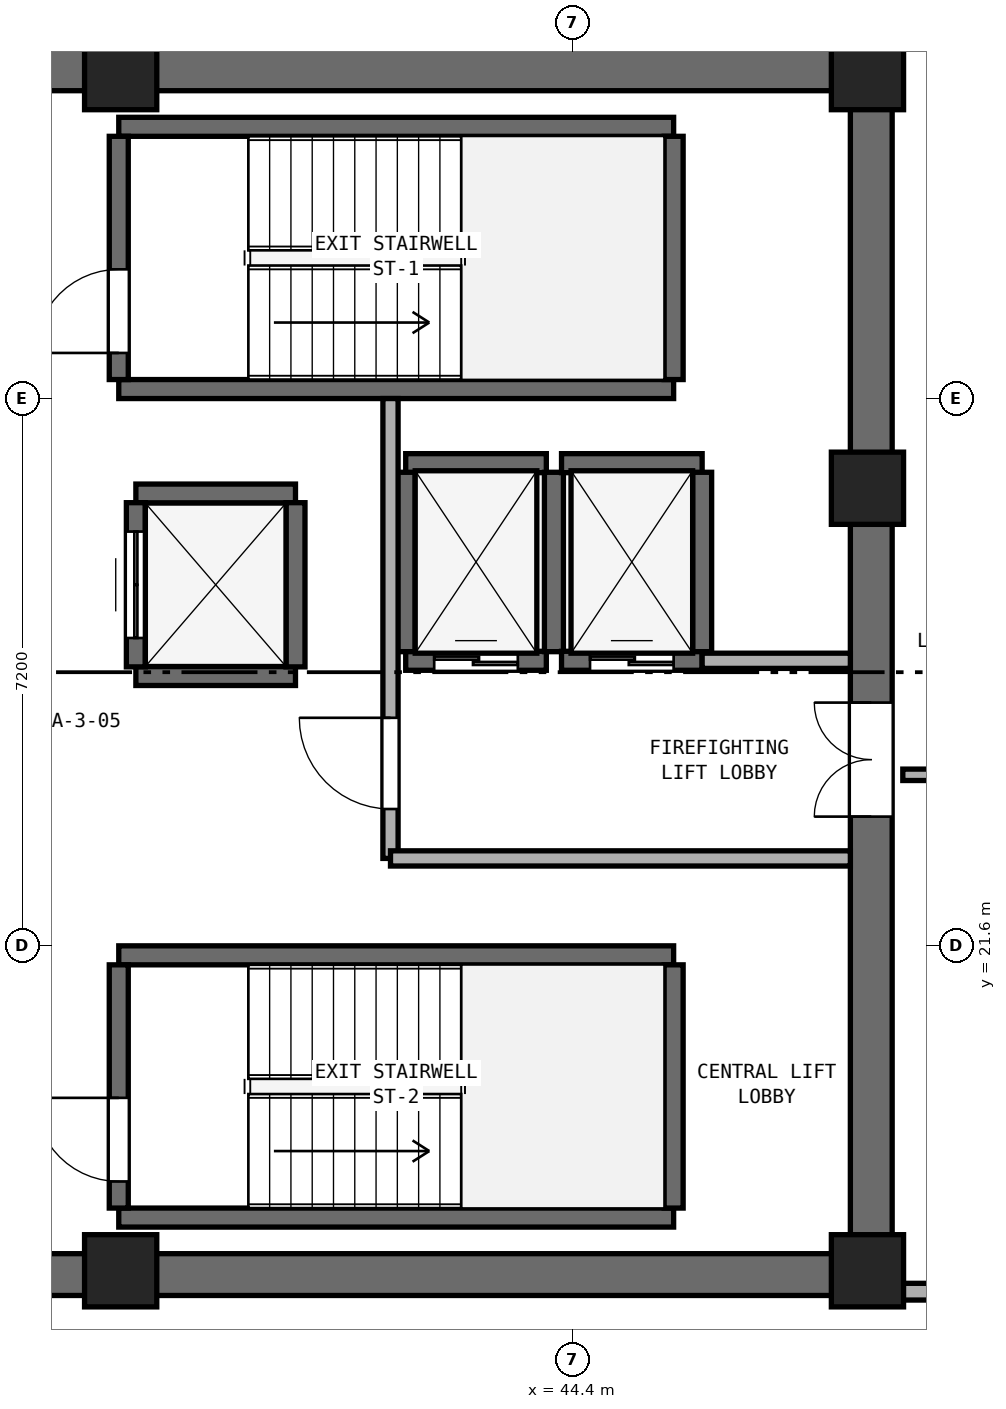
"""IFC4 building model, lengths in metres.
Left out: names, types, materials, properties, quantities, classifications, styles, units other than length and angle.
Written with IfcOpenShell. Run it as: python <this file> out.ifc"""

import sys

from ifc_helpers import new_model, si_unit, direction, frame, frame_2d, origin, origin_2d, place, context, subcontext, project, spatial, rectangle, extrude, element, fill, save


model = new_model("IFC4")
c1 = context("Model", 3, precision=1e-05, world=origin(), true_north=direction((0.0, 1.0)))
c2 = subcontext(c1, "Body", "Model", "MODEL_VIEW")
j1 = project(units=[si_unit("LENGTHUNIT", "METRE"), si_unit("PLANEANGLEUNIT", "RADIAN")], contexts=[c1])
p1 = place(None, origin())
s1 = spatial("IfcSite", under=j1, at=p1, CompositionType="ELEMENT")
p2 = place(p1, origin())
s2 = spatial("IfcBuilding", under=s1, at=p2, CompositionType="ELEMENT")
p3 = place(p2, frame((0.0, 0.0, 201.0)))
s3 = spatial("IfcBuildingStorey", under=s2, at=p3, CompositionType="ELEMENT", Elevation=201.0)
for number, where, z_axis, x_axis in (
    (1, (25.4, 17.275, 0.0), (0.0, 0.0, 1.0), (1.0, 0.0, 0.0)),
    (2, (25.4, 33.125, 0.0), (0.0, 0.0, 1.0), (1.0, 0.0, 0.0)),
):
    element("IfcWall", number, at=place(p3, frame(where, z_axis=z_axis, x_axis=x_axis)), inside=s3, PredefinedType="SHEAR", context=c2, shape_type="SweptSolid", body=[
        extrude(rectangle(XDim=23.2, YDim=0.55, at=frame_2d((11.6, 0.0))), origin(), (0.0, 0.0, 1.0), 3.54),
    ])
p4 = place(p3, frame((48.325, 17.55, 0.0), z_axis=(0.0, 0.0, 1.0), x_axis=(0.0, 1.0, 0.0)))
e3 = element("IfcWall", 3, at=p4, inside=s3, PredefinedType="SHEAR", context=c2, shape_type="SweptSolid", body=[
    extrude(rectangle(XDim=15.3, YDim=0.55, at=frame_2d((7.65, 0.0))), origin(), (0.0, 0.0, 1.0), 3.54),
])
p5 = place(p4, frame((5.75, 0.0, 0.0)))
e4 = element("IfcOpeningElement", 4, at=p5, cuts=e3, PredefinedType="OPENING", context=c2, shape_type="SweptSolid", body=[
    extrude(rectangle(XDim=1.5, YDim=2.15, at=frame_2d((0.75, 1.075))), frame((0.0, 0.285, 0.0), z_axis=(0.0, -1.0, 0.0), x_axis=(1.0, 0.0, 0.0)), (0.0, 0.0, 1.0), 0.57),
])
for number, where, z_axis, x_axis in (
    (5, (38.45, 17.325, 0.0), (0.0, 0.0, 1.0), (1.0, 0.0, 0.0)),
    (6, (48.275, 17.325, 0.0), (0.0, 0.0, 1.0), (1.0, 0.0, 0.0)),
    (7, (48.275, 27.62, 0.0), (0.0, 0.0, 1.0), (1.0, 0.0, 0.0)),
    (8, (48.275, 33.075, 0.0), (0.0, 0.0, 1.0), (1.0, 0.0, 0.0)),
    (9, (38.45, 33.075, 0.0), (0.0, 0.0, 1.0), (1.0, 0.0, 0.0)),
):
    element("IfcColumn", number, at=place(p3, frame(where, z_axis=z_axis, x_axis=x_axis)), inside=s3, PredefinedType="PILASTER", context=c2, shape_type="SweptSolid", body=[
        extrude(rectangle(XDim=0.95, YDim=0.95, at=origin_2d()), origin(), (0.0, 0.0, 1.0), 3.8),
    ])
for number, where, z_axis, x_axis in (
    (10, (38.425, 28.925, 0.0), (0.0, 0.0, 1.0), (1.0, 0.0, 0.0)),
    (11, (38.425, 32.375, 0.0), (0.0, 0.0, 1.0), (1.0, 0.0, 0.0)),
):
    element("IfcWall", number, at=place(p3, frame(where, z_axis=z_axis, x_axis=x_axis)), inside=s3, PredefinedType="SHEAR", context=c2, shape_type="SweptSolid", body=[
        extrude(rectangle(XDim=7.3, YDim=0.25, at=frame_2d((3.65, 0.0))), origin(), (0.0, 0.0, 1.0), 3.54),
    ])
p6 = place(p3, frame((38.425, 29.05, 0.0), z_axis=(0.0, 0.0, 1.0), x_axis=(0.0, 1.0, 0.0)))
e12 = element("IfcWall", 12, at=p6, inside=s3, PredefinedType="SHEAR", context=c2, shape_type="SweptSolid", body=[
    extrude(rectangle(XDim=3.2, YDim=0.25, at=frame_2d((1.6, 0.0))), origin(), (0.0, 0.0, 1.0), 3.54),
])
p7 = place(p6, frame((0.35, 0.0, 0.0)))
e13 = element("IfcOpeningElement", 13, at=p7, cuts=e12, PredefinedType="OPENING", context=c2, shape_type="SweptSolid", body=[
    extrude(rectangle(XDim=1.1, YDim=2.15, at=frame_2d((0.55, 1.075))), frame((0.0, 0.135, 0.0), z_axis=(0.0, -1.0, 0.0), x_axis=(1.0, 0.0, 0.0)), (0.0, 0.0, 1.0), 0.27),
])
p8 = place(p3, frame((45.725, 29.05, 0.0), z_axis=(0.0, 0.0, 1.0), x_axis=(0.0, 1.0, 0.0)))
e14 = element("IfcWall", 14, at=p8, inside=s3, PredefinedType="SHEAR", context=c2, shape_type="SweptSolid", body=[
    extrude(rectangle(XDim=3.2, YDim=0.25, at=frame_2d((1.6, 0.0))), origin(), (0.0, 0.0, 1.0), 3.54),
])
for number, where, z_axis, x_axis in (
    (15, (38.425, 18.025, 0.0), (0.0, 0.0, 1.0), (1.0, 0.0, 0.0)),
    (16, (38.425, 21.475, 0.0), (0.0, 0.0, 1.0), (1.0, 0.0, 0.0)),
):
    element("IfcWall", number, at=place(p3, frame(where, z_axis=z_axis, x_axis=x_axis)), inside=s3, PredefinedType="SHEAR", context=c2, shape_type="SweptSolid", body=[
        extrude(rectangle(XDim=7.3, YDim=0.25, at=frame_2d((3.65, 0.0))), origin(), (0.0, 0.0, 1.0), 3.54),
    ])
p9 = place(p3, frame((38.425, 18.15, 0.0), z_axis=(0.0, 0.0, 1.0), x_axis=(0.0, 1.0, 0.0)))
e17 = element("IfcWall", 17, at=p9, inside=s3, PredefinedType="SHEAR", context=c2, shape_type="SweptSolid", body=[
    extrude(rectangle(XDim=3.2, YDim=0.25, at=frame_2d((1.6, 0.0))), origin(), (0.0, 0.0, 1.0), 3.54),
])
p10 = place(p9, frame((0.35, 0.0, 0.0)))
e18 = element("IfcOpeningElement", 18, at=p10, cuts=e17, PredefinedType="OPENING", context=c2, shape_type="SweptSolid", body=[
    extrude(rectangle(XDim=1.1, YDim=2.15, at=frame_2d((0.55, 1.075))), frame((0.0, 0.135, 0.0), z_axis=(0.0, -1.0, 0.0), x_axis=(1.0, 0.0, 0.0)), (0.0, 0.0, 1.0), 0.27),
])
p11 = place(p3, frame((45.725, 18.15, 0.0), z_axis=(0.0, 0.0, 1.0), x_axis=(0.0, 1.0, 0.0)))
e19 = element("IfcWall", 19, at=p11, inside=s3, PredefinedType="SHEAR", context=c2, shape_type="SweptSolid", body=[
    extrude(rectangle(XDim=3.2, YDim=0.25, at=frame_2d((1.6, 0.0))), origin(), (0.0, 0.0, 1.0), 3.54),
])
p12 = place(p3, frame((42.2, 25.35, 0.0), z_axis=(0.0, 0.0, 1.0), x_axis=(1.0, 0.0, 0.0)))
e20 = element("IfcWall", 20, at=p12, inside=s3, PredefinedType="SHEAR", context=c2, shape_type="SweptSolid", body=[
    extrude(rectangle(XDim=1.85, YDim=0.25, at=frame_2d((0.925, 0.0))), origin(), (0.0, 0.0, 1.0), 3.54),
])
p13 = place(p12, frame((0.375, 0.0, 0.0)))
e21 = element("IfcOpeningElement", 21, at=p13, cuts=e20, PredefinedType="OPENING", context=c2, shape_type="SweptSolid", body=[
    extrude(rectangle(XDim=1.1, YDim=2.15, at=frame_2d((0.55, 1.075))), frame((0.0, 0.135, 0.0), z_axis=(0.0, -1.0, 0.0), x_axis=(1.0, 0.0, 0.0)), (0.0, 0.0, 1.0), 0.27),
])
p14 = place(p3, frame((42.2, 27.95, 0.0), z_axis=(0.0, 0.0, 1.0), x_axis=(1.0, 0.0, 0.0)))
e22 = element("IfcWall", 22, at=p14, inside=s3, PredefinedType="SHEAR", context=c2, shape_type="SweptSolid", body=[
    extrude(rectangle(XDim=1.85, YDim=0.25, at=frame_2d((0.925, 0.0))), origin(), (0.0, 0.0, 1.0), 3.54),
])
for number, where, z_axis, x_axis in (
    (23, (42.2, 25.47, 0.0), (0.0, 0.0, 1.0), (0.0, 1.0, 0.0)),
    (24, (44.15, 25.47, 0.0), (0.0, 0.0, 1.0), (0.0, 1.0, 0.0)),
):
    element("IfcWall", number, at=place(p3, frame(where, z_axis=z_axis, x_axis=x_axis)), inside=s3, PredefinedType="SHEAR", context=c2, shape_type="SweptSolid", body=[
        extrude(rectangle(XDim=2.36, YDim=0.25, at=frame_2d((1.18, 0.0))), origin(), (0.0, 0.0, 1.0), 3.54),
    ])
p15 = place(p3, frame((44.25, 25.35, 0.0), z_axis=(0.0, 0.0, 1.0), x_axis=(1.0, 0.0, 0.0)))
e25 = element("IfcWall", 25, at=p15, inside=s3, PredefinedType="SHEAR", context=c2, shape_type="SweptSolid", body=[
    extrude(rectangle(XDim=1.85, YDim=0.25, at=frame_2d((0.925, 0.0))), origin(), (0.0, 0.0, 1.0), 3.54),
])
p16 = place(p15, frame((0.375, 0.0, 0.0)))
e26 = element("IfcOpeningElement", 26, at=p16, cuts=e25, PredefinedType="OPENING", context=c2, shape_type="SweptSolid", body=[
    extrude(rectangle(XDim=1.1, YDim=2.15, at=frame_2d((0.55, 1.075))), frame((0.0, 0.135, 0.0), z_axis=(0.0, -1.0, 0.0), x_axis=(1.0, 0.0, 0.0)), (0.0, 0.0, 1.0), 0.27),
])
p17 = place(p3, frame((44.25, 27.95, 0.0), z_axis=(0.0, 0.0, 1.0), x_axis=(1.0, 0.0, 0.0)))
e27 = element("IfcWall", 27, at=p17, inside=s3, PredefinedType="SHEAR", context=c2, shape_type="SweptSolid", body=[
    extrude(rectangle(XDim=1.85, YDim=0.25, at=frame_2d((0.925, 0.0))), origin(), (0.0, 0.0, 1.0), 3.54),
])
p18 = place(p3, frame((46.1, 25.47, 0.0), z_axis=(0.0, 0.0, 1.0), x_axis=(0.0, 1.0, 0.0)))
e28 = element("IfcWall", 28, at=p18, inside=s3, PredefinedType="SHEAR", context=c2, shape_type="SweptSolid", body=[
    extrude(rectangle(XDim=2.36, YDim=0.25, at=frame_2d((1.18, 0.0))), origin(), (0.0, 0.0, 1.0), 3.54),
])
for number, where, z_axis, x_axis in (
    (29, (38.65, 25.15, 0.0), (0.0, 0.0, 1.0), (1.0, 0.0, 0.0)),
    (30, (38.65, 27.55, 0.0), (0.0, 0.0, 1.0), (1.0, 0.0, 0.0)),
):
    element("IfcWall", number, at=place(p3, frame(where, z_axis=z_axis, x_axis=x_axis)), inside=s3, PredefinedType="SHEAR", context=c2, shape_type="SweptSolid", body=[
        extrude(rectangle(XDim=2.1, YDim=0.25, at=frame_2d((1.05, 0.0))), origin(), (0.0, 0.0, 1.0), 3.54),
    ])
p19 = place(p3, frame((38.65, 25.27, 0.0), z_axis=(0.0, 0.0, 1.0), x_axis=(0.0, 1.0, 0.0)))
e31 = element("IfcWall", 31, at=p19, inside=s3, PredefinedType="SHEAR", context=c2, shape_type="SweptSolid", body=[
    extrude(rectangle(XDim=2.16, YDim=0.25, at=frame_2d((1.08, 0.0))), origin(), (0.0, 0.0, 1.0), 3.54),
])
p20 = place(p19, frame((0.38, 0.0, 0.0)))
e32 = element("IfcOpeningElement", 32, at=p20, cuts=e31, PredefinedType="OPENING", context=c2, shape_type="SweptSolid", body=[
    extrude(rectangle(XDim=1.4, YDim=2.2, at=frame_2d((0.7, 1.1))), frame((0.0, 0.135, 0.0), z_axis=(0.0, -1.0, 0.0), x_axis=(1.0, 0.0, 0.0)), (0.0, 0.0, 1.0), 0.27),
])
p21 = place(p3, frame((40.75, 25.27, 0.0), z_axis=(0.0, 0.0, 1.0), x_axis=(0.0, 1.0, 0.0)))
e33 = element("IfcWall", 33, at=p21, inside=s3, PredefinedType="SHEAR", context=c2, shape_type="SweptSolid", body=[
    extrude(rectangle(XDim=2.16, YDim=0.25, at=frame_2d((1.08, 0.0))), origin(), (0.0, 0.0, 1.0), 3.54),
])
p22 = place(p3, frame((42.0, 22.75, 0.0), z_axis=(0.0, 0.0, 1.0), x_axis=(0.0, 1.0, 0.0)))
e34 = element("IfcWall", 34, at=p22, inside=s3, PredefinedType="SOLIDWALL", context=c2, shape_type="SweptSolid", body=[
    extrude(rectangle(XDim=6.05, YDim=0.2, at=frame_2d((3.025, 0.0))), origin(), (0.0, 0.0, 1.0), 3.54),
])
p23 = place(p22, frame((0.65, 0.0, 0.0)))
e35 = element("IfcOpeningElement", 35, at=p23, cuts=e34, PredefinedType="OPENING", context=c2, shape_type="SweptSolid", body=[
    extrude(rectangle(XDim=1.2, YDim=2.15, at=frame_2d((0.6, 1.075))), frame((0.0, 0.11, 0.0), z_axis=(0.0, -1.0, 0.0), x_axis=(1.0, 0.0, 0.0)), (0.0, 0.0, 1.0), 0.22),
])
p24 = place(p3, frame((42.0, 22.75, 0.0), z_axis=(0.0, 0.0, 1.0), x_axis=(1.0, 0.0, 0.0)))
e36 = element("IfcWall", 36, at=p24, inside=s3, PredefinedType="SOLIDWALL", context=c2, shape_type="SweptSolid", body=[
    extrude(rectangle(XDim=6.05, YDim=0.2, at=frame_2d((3.025, 0.0))), origin(), (0.0, 0.0, 1.0), 3.54),
])
p25 = place(p3, frame((46.1, 25.35, 0.0), z_axis=(0.0, 0.0, 1.0), x_axis=(1.0, 0.0, 0.0)))
e37 = element("IfcWall", 37, at=p25, inside=s3, PredefinedType="SOLIDWALL", context=c2, shape_type="SweptSolid", body=[
    extrude(rectangle(XDim=1.95, YDim=0.2, at=frame_2d((0.975, 0.0))), origin(), (0.0, 0.0, 1.0), 3.54),
])
p26 = place(p3, frame((48.74, 17.05, 0.0), z_axis=(0.0, 0.0, 1.0), x_axis=(1.0, 0.0, 0.0)))
e38 = element("IfcWall", 38, at=p26, inside=s3, PredefinedType="PARTITIONING", context=c2, shape_type="SweptSolid", body=[
    extrude(rectangle(XDim=1.51, YDim=0.22, at=frame_2d((0.755, 0.0))), origin(), (0.0, 0.0, 1.0), 2.923),
])
p27 = place(p3, frame((48.74, 23.85, 0.0), z_axis=(0.0, 0.0, 1.0), x_axis=(1.0, 0.0, 0.0)))
e39 = element("IfcWall", 39, at=p27, inside=s3, PredefinedType="PARTITIONING", context=c2, shape_type="SweptSolid", body=[
    extrude(rectangle(XDim=14.855, YDim=0.15, at=frame_2d((7.427, 0.0))), origin(), (0.0, 0.0, 1.0), 3.54),
])
p28 = place(p27, frame((6.978, 0.0, 0.0)))
e40 = element("IfcOpeningElement", 40, at=p28, cuts=e39, PredefinedType="OPENING", context=c2, shape_type="SweptSolid", body=[
    extrude(rectangle(XDim=0.9, YDim=2.1, at=frame_2d((0.45, 1.05))), frame((0.0, 0.085, 0.0), z_axis=(0.0, -1.0, 0.0), x_axis=(1.0, 0.0, 0.0)), (0.0, 0.0, 1.0), 0.17),
])
p29 = place(p7, origin())
e41 = element("IfcDoor", 41, at=p29, inside=s3, OperationType="SINGLE_SWING_LEFT", PredefinedType="DOOR", context=c2, shape_type="SweptSolid", body=[
    extrude(rectangle(XDim=1.1, YDim=2.15, at=frame_2d((0.55, 1.075))), frame((0.0, 0.025, 0.0), z_axis=(0.0, -1.0, 0.0), x_axis=(1.0, 0.0, 0.0)), (0.0, 0.0, 1.0), 0.05),
])
fill(e13, e41)
p30 = place(p10, origin())
e42 = element("IfcDoor", 42, at=p30, inside=s3, OperationType="SINGLE_SWING_RIGHT", PredefinedType="DOOR", context=c2, shape_type="SweptSolid", body=[
    extrude(rectangle(XDim=1.1, YDim=2.15, at=frame_2d((0.55, 1.075))), frame((0.0, 0.025, 0.0), z_axis=(0.0, -1.0, 0.0), x_axis=(1.0, 0.0, 0.0)), (0.0, 0.0, 1.0), 0.05),
])
fill(e18, e42)
p31 = place(p13, origin())
e43 = element("IfcDoor", 43, at=p31, inside=s3, OperationType="DOUBLE_DOOR_SLIDING", PredefinedType="DOOR", context=c2, shape_type="SweptSolid", body=[
    extrude(rectangle(XDim=1.1, YDim=2.15, at=frame_2d((0.55, 1.075))), frame((0.0, 0.025, 0.0), z_axis=(0.0, -1.0, 0.0), x_axis=(1.0, 0.0, 0.0)), (0.0, 0.0, 1.0), 0.05),
])
fill(e21, e43)
p32 = place(p16, origin())
e44 = element("IfcDoor", 44, at=p32, inside=s3, OperationType="DOUBLE_DOOR_SLIDING", PredefinedType="DOOR", context=c2, shape_type="SweptSolid", body=[
    extrude(rectangle(XDim=1.1, YDim=2.15, at=frame_2d((0.55, 1.075))), frame((0.0, 0.025, 0.0), z_axis=(0.0, -1.0, 0.0), x_axis=(1.0, 0.0, 0.0)), (0.0, 0.0, 1.0), 0.05),
])
fill(e26, e44)
p33 = place(p20, origin())
e45 = element("IfcDoor", 45, at=p33, inside=s3, OperationType="DOUBLE_DOOR_SLIDING", PredefinedType="DOOR", context=c2, shape_type="SweptSolid", body=[
    extrude(rectangle(XDim=1.4, YDim=2.2, at=frame_2d((0.7, 1.1))), frame((0.0, 0.025, 0.0), z_axis=(0.0, -1.0, 0.0), x_axis=(1.0, 0.0, 0.0)), (0.0, 0.0, 1.0), 0.05),
])
fill(e32, e45)
p34 = place(p23, origin())
e46 = element("IfcDoor", 46, at=p34, inside=s3, OperationType="SINGLE_SWING_RIGHT", PredefinedType="DOOR", context=c2, shape_type="SweptSolid", body=[
    extrude(rectangle(XDim=1.2, YDim=2.15, at=frame_2d((0.6, 1.075))), frame((0.0, 0.025, 0.0), z_axis=(0.0, -1.0, 0.0), x_axis=(1.0, 0.0, 0.0)), (0.0, 0.0, 1.0), 0.05),
])
fill(e35, e46)
p35 = place(p5, origin())
e47 = element("IfcDoor", 47, at=p35, inside=s3, OperationType="DOUBLE_DOOR_SINGLE_SWING", PredefinedType="DOOR", context=c2, shape_type="SweptSolid", body=[
    extrude(rectangle(XDim=1.5, YDim=2.15, at=frame_2d((0.75, 1.075))), frame((0.0, 0.025, 0.0), z_axis=(0.0, -1.0, 0.0), x_axis=(1.0, 0.0, 0.0)), (0.0, 0.0, 1.0), 0.05),
])
fill(e4, e47)
save(model, sys.argv[1])
